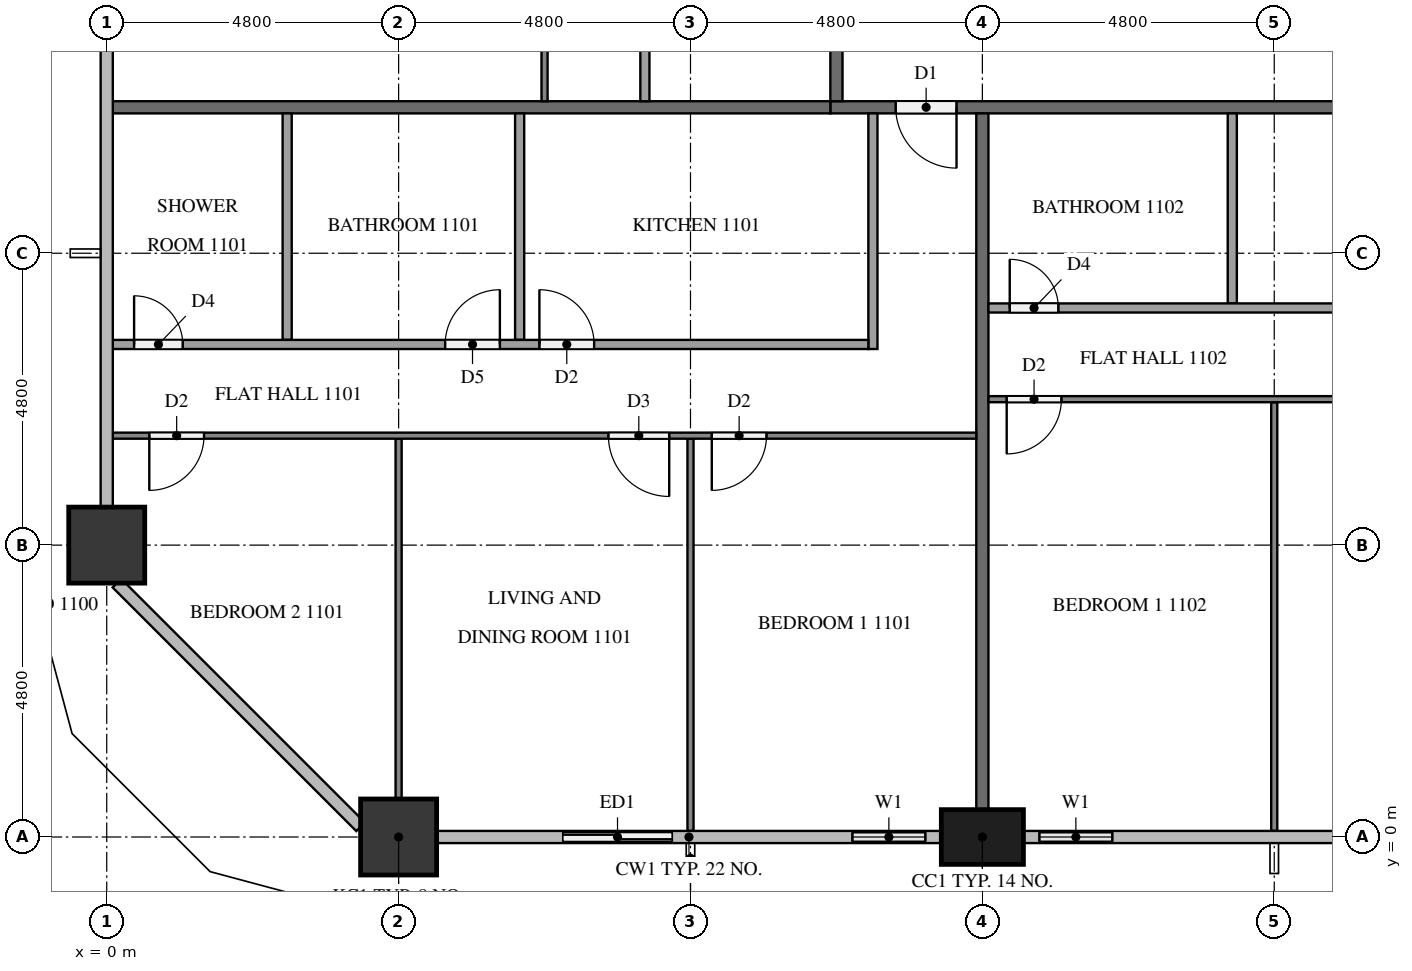
"""IFC4 building model, lengths in metres.
Left out: names, types, materials, properties, quantities, classifications, styles, units other than length and angle.
Written with IfcOpenShell. Run it as: python <this file> out.ifc"""

import sys

from ifc_helpers import new_model, si_unit, direction, frame, frame_2d, origin, origin_2d, place, context, subcontext, project, spatial, rectangle, extrude, element, fill, save


model = new_model("IFC4")
c1 = context("Model", 3, precision=1e-05, world=origin(), true_north=direction((0.0, 1.0)))
c2 = subcontext(c1, "Body", "Model", "MODEL_VIEW")
j1 = project(units=[si_unit("LENGTHUNIT", "METRE"), si_unit("PLANEANGLEUNIT", "RADIAN")], contexts=[c1])
p1 = place(None, origin())
s1 = spatial("IfcSite", under=j1, at=p1, CompositionType="ELEMENT")
p2 = place(p1, origin())
s2 = spatial("IfcBuilding", under=s1, at=p2, CompositionType="ELEMENT")
p3 = place(p2, frame((0.0, 0.0, 46.9)))
s3 = spatial("IfcBuildingStorey", under=s2, at=p3, CompositionType="ELEMENT", Elevation=46.9)
p4 = place(p3, frame((4.8, 0.0, 0.0), z_axis=(0.0, 0.0, 1.0), x_axis=(1.0, 0.0, 0.0)))
e1 = element("IfcColumn", 1, at=p4, inside=s3, PredefinedType="COLUMN", context=c2, shape_type="SweptSolid", body=[
    extrude(rectangle(XDim=1.25, YDim=1.25, at=origin_2d()), origin(), (0.0, 0.0, 1.0), 3.2),
])
p5 = place(p3, frame((14.4, 0.0, 0.0), z_axis=(0.0, 0.0, 1.0), x_axis=(1.0, 0.0, 0.0)))
e2 = element("IfcColumn", 2, at=p5, inside=s3, PredefinedType="COLUMN", context=c2, shape_type="SweptSolid", body=[
    extrude(rectangle(XDim=1.35, YDim=0.9, at=origin_2d()), origin(), (0.0, 0.0, 1.0), 3.2),
])
p6 = place(p3, frame((0.0, 4.8, 0.0), z_axis=(0.0, 0.0, 1.0), x_axis=(1.0, 0.0, 0.0)))
e3 = element("IfcColumn", 3, at=p6, inside=s3, PredefinedType="COLUMN", context=c2, shape_type="SweptSolid", body=[
    extrude(rectangle(XDim=1.25, YDim=1.25, at=origin_2d()), origin(), (0.0, 0.0, 1.0), 3.2),
])
p7 = place(p3, frame((7.2, 0.0, 0.0), z_axis=(0.0, 0.0, 1.0), x_axis=(1.0, 0.0, 0.0)))
e4 = element("IfcWall", 4, at=p7, inside=s3, PredefinedType="SOLIDWALL", context=c2, shape_type="SweptSolid", body=[
    extrude(rectangle(XDim=2.4, YDim=0.15, at=frame_2d((1.2, 0.0))), origin(), (0.0, 0.0, 1.0), 3.2),
])
p8 = place(p7, frame((0.3, 0.0, 0.0)))
e5 = element("IfcOpeningElement", 5, at=p8, cuts=e4, PredefinedType="OPENING", context=c2, shape_type="SweptSolid", body=[
    extrude(rectangle(XDim=1.8, YDim=2.4, at=frame_2d((0.9, 1.2))), frame((0.0, 0.085, 0.0), z_axis=(0.0, -1.0, 0.0), x_axis=(1.0, 0.0, 0.0)), (0.0, 0.0, 1.0), 0.17),
])
p9 = place(p3, frame((12.0, 0.0, 0.0), z_axis=(0.0, 0.0, 1.0), x_axis=(1.0, 0.0, 0.0)))
e6 = element("IfcWall", 6, at=p9, inside=s3, PredefinedType="SOLIDWALL", context=c2, shape_type="SweptSolid", body=[
    extrude(rectangle(XDim=1.725, YDim=0.15, at=frame_2d((0.863, 0.0))), origin(), (0.0, 0.0, 1.0), 3.2),
])
p10 = place(p9, frame((0.262, 0.0, 0.9)))
e7 = element("IfcOpeningElement", 7, at=p10, cuts=e6, PredefinedType="OPENING", context=c2, shape_type="SweptSolid", body=[
    extrude(rectangle(XDim=1.2, YDim=1.4, at=frame_2d((0.6, 0.7))), frame((0.0, 0.085, 0.0), z_axis=(0.0, -1.0, 0.0), x_axis=(1.0, 0.0, 0.0)), (0.0, 0.0, 1.0), 0.17),
])
p11 = place(p3, frame((15.075, 0.0, 0.0), z_axis=(0.0, 0.0, 1.0), x_axis=(1.0, 0.0, 0.0)))
e8 = element("IfcWall", 8, at=p11, inside=s3, PredefinedType="SOLIDWALL", context=c2, shape_type="SweptSolid", body=[
    extrude(rectangle(XDim=1.725, YDim=0.15, at=frame_2d((0.863, 0.0))), origin(), (0.0, 0.0, 1.0), 3.2),
])
p12 = place(p11, frame((0.262, 0.0, 0.9)))
e9 = element("IfcOpeningElement", 9, at=p12, cuts=e8, PredefinedType="OPENING", context=c2, shape_type="SweptSolid", body=[
    extrude(rectangle(XDim=1.2, YDim=1.4, at=frame_2d((0.6, 0.7))), frame((0.0, 0.085, 0.0), z_axis=(0.0, -1.0, 0.0), x_axis=(1.0, 0.0, 0.0)), (0.0, 0.0, 1.0), 0.17),
])
p13 = place(p3, frame((50.5, 12.0, 0.0), z_axis=(0.0, 0.0, 1.0), x_axis=(-1.0, 0.0, 0.0)))
e10 = element("IfcWall", 10, at=p13, inside=s3, PredefinedType="PARTITIONING", context=c2, shape_type="SweptSolid", body=[
    extrude(rectangle(XDim=38.6, YDim=0.2, at=frame_2d((19.3, 0.0))), origin(), (0.0, 0.0, 1.0), 3.2),
])
p14 = place(p13, frame((36.525, 0.0, 0.0)))
e11 = element("IfcOpeningElement", 11, at=p14, cuts=e10, PredefinedType="OPENING", context=c2, shape_type="SweptSolid", body=[
    extrude(rectangle(XDim=1.0, YDim=2.1, at=frame_2d((0.5, 1.05))), frame((0.0, 0.11, 0.0), z_axis=(0.0, -1.0, 0.0), x_axis=(1.0, 0.0, 0.0)), (0.0, 0.0, 1.0), 0.22),
])
p15 = place(p13, frame((24.525, 0.0, 0.0)))
e12 = element("IfcOpeningElement", 12, at=p15, cuts=e10, PredefinedType="OPENING", context=c2, shape_type="SweptSolid", body=[
    extrude(rectangle(XDim=1.0, YDim=2.1, at=frame_2d((0.5, 1.05))), frame((0.0, 0.11, 0.0), z_axis=(0.0, -1.0, 0.0), x_axis=(1.0, 0.0, 0.0)), (0.0, 0.0, 1.0), 0.22),
])
p16 = place(p13, frame((22.675, 0.0, 0.0)))
e13 = element("IfcOpeningElement", 13, at=p16, cuts=e10, PredefinedType="OPENING", context=c2, shape_type="SweptSolid", body=[
    extrude(rectangle(XDim=1.0, YDim=2.1, at=frame_2d((0.5, 1.05))), frame((0.0, 0.11, 0.0), z_axis=(0.0, -1.0, 0.0), x_axis=(1.0, 0.0, 0.0)), (0.0, 0.0, 1.0), 0.22),
])
p17 = place(p13, frame((8.275, 0.0, 0.0)))
e14 = element("IfcOpeningElement", 14, at=p17, cuts=e10, PredefinedType="OPENING", context=c2, shape_type="SweptSolid", body=[
    extrude(rectangle(XDim=1.0, YDim=2.1, at=frame_2d((0.5, 1.05))), frame((0.0, 0.11, 0.0), z_axis=(0.0, -1.0, 0.0), x_axis=(1.0, 0.0, 0.0)), (0.0, 0.0, 1.0), 0.22),
])
p18 = place(p3, frame((12.0, 12.1, 0.0), z_axis=(0.0, 0.0, 1.0), x_axis=(0.0, 1.0, 0.0)))
e15 = element("IfcWall", 15, at=p18, inside=s3, PredefinedType="PARTITIONING", context=c2, shape_type="SweptSolid", body=[
    extrude(rectangle(XDim=28.6, YDim=0.2, at=frame_2d((14.3, 0.0))), origin(), (0.0, 0.0, 1.0), 3.2),
])
p19 = place(p18, frame((26.725, 0.0, 0.0)))
e16 = element("IfcOpeningElement", 16, at=p19, cuts=e15, PredefinedType="OPENING", context=c2, shape_type="SweptSolid", body=[
    extrude(rectangle(XDim=1.0, YDim=2.1, at=frame_2d((0.5, 1.05))), frame((0.0, 0.11, 0.0), z_axis=(0.0, -1.0, 0.0), x_axis=(1.0, 0.0, 0.0)), (0.0, 0.0, 1.0), 0.22),
])
p20 = place(p18, frame((17.125, 0.0, 0.0)))
e17 = element("IfcOpeningElement", 17, at=p20, cuts=e15, PredefinedType="OPENING", context=c2, shape_type="SweptSolid", body=[
    extrude(rectangle(XDim=1.0, YDim=2.1, at=frame_2d((0.5, 1.05))), frame((0.0, 0.11, 0.0), z_axis=(0.0, -1.0, 0.0), x_axis=(1.0, 0.0, 0.0)), (0.0, 0.0, 1.0), 0.22),
])
p21 = place(p18, frame((15.275, 0.0, 0.0)))
e18 = element("IfcOpeningElement", 18, at=p21, cuts=e15, PredefinedType="OPENING", context=c2, shape_type="SweptSolid", body=[
    extrude(rectangle(XDim=1.0, YDim=2.1, at=frame_2d((0.5, 1.05))), frame((0.0, 0.11, 0.0), z_axis=(0.0, -1.0, 0.0), x_axis=(1.0, 0.0, 0.0)), (0.0, 0.0, 1.0), 0.22),
])
p22 = place(p18, frame((5.675, 0.0, 0.0)))
e19 = element("IfcOpeningElement", 19, at=p22, cuts=e15, PredefinedType="OPENING", context=c2, shape_type="SweptSolid", body=[
    extrude(rectangle(XDim=1.0, YDim=2.1, at=frame_2d((0.5, 1.05))), frame((0.0, 0.11, 0.0), z_axis=(0.0, -1.0, 0.0), x_axis=(1.0, 0.0, 0.0)), (0.0, 0.0, 1.0), 0.22),
])
p23 = place(p3, frame((14.4, 11.9, 0.0), z_axis=(0.0, 0.0, 1.0), x_axis=(0.0, -1.0, 0.0)))
e20 = element("IfcWall", 20, at=p23, inside=s3, PredefinedType="PARTITIONING", context=c2, shape_type="SweptSolid", body=[
    extrude(rectangle(XDim=11.45, YDim=0.2, at=frame_2d((5.725, 0.0))), origin(), (0.0, 0.0, 1.0), 3.2),
])
p24 = place(p3, frame((0.1, 12.0, 0.0), z_axis=(0.0, 0.0, 1.0), x_axis=(1.0, 0.0, 0.0)))
e21 = element("IfcWall", 21, at=p24, inside=s3, PredefinedType="PARTITIONING", context=c2, shape_type="SweptSolid", body=[
    extrude(rectangle(XDim=11.8, YDim=0.2, at=frame_2d((5.9, 0.0))), origin(), (0.0, 0.0, 1.0), 3.2),
])
p25 = place(p3, frame((9.6, 6.55, 0.0), z_axis=(0.0, 0.0, 1.0), x_axis=(0.0, -1.0, 0.0)))
e22 = element("IfcWall", 22, at=p25, inside=s3, PredefinedType="PARTITIONING", context=c2, shape_type="SweptSolid", body=[
    extrude(rectangle(XDim=6.45, YDim=0.1, at=frame_2d((3.225, 0.0))), origin(), (0.0, 0.0, 1.0), 3.2),
])
p26 = place(p3, frame((4.8, 6.55, 0.0), z_axis=(0.0, 0.0, 1.0), x_axis=(0.0, -1.0, 0.0)))
e23 = element("IfcWall", 23, at=p26, inside=s3, PredefinedType="PARTITIONING", context=c2, shape_type="SweptSolid", body=[
    extrude(rectangle(XDim=5.925, YDim=0.1, at=frame_2d((2.962, 0.0))), origin(), (0.0, 0.0, 1.0), 3.2),
])
p27 = place(p3, frame((14.3, 6.6, 0.0), z_axis=(0.0, 0.0, 1.0), x_axis=(-1.0, 0.0, 0.0)))
e24 = element("IfcWall", 24, at=p27, inside=s3, PredefinedType="PARTITIONING", context=c2, shape_type="SweptSolid", body=[
    extrude(rectangle(XDim=14.2, YDim=0.1, at=frame_2d((7.1, 0.0))), origin(), (0.0, 0.0, 1.0), 3.2),
])
p28 = place(p27, frame((3.45, 0.0, 0.0)))
e25 = element("IfcOpeningElement", 25, at=p28, cuts=e24, PredefinedType="OPENING", context=c2, shape_type="SweptSolid", body=[
    extrude(rectangle(XDim=0.9, YDim=2.1, at=frame_2d((0.45, 1.05))), frame((0.0, 0.06, 0.0), z_axis=(0.0, -1.0, 0.0), x_axis=(1.0, 0.0, 0.0)), (0.0, 0.0, 1.0), 0.12),
])
p29 = place(p27, frame((5.05, 0.0, 0.0)))
e26 = element("IfcOpeningElement", 26, at=p29, cuts=e24, PredefinedType="OPENING", context=c2, shape_type="SweptSolid", body=[
    extrude(rectangle(XDim=1.0, YDim=2.1, at=frame_2d((0.5, 1.05))), frame((0.0, 0.06, 0.0), z_axis=(0.0, -1.0, 0.0), x_axis=(1.0, 0.0, 0.0)), (0.0, 0.0, 1.0), 0.12),
])
p30 = place(p27, frame((12.7, 0.0, 0.0)))
e27 = element("IfcOpeningElement", 27, at=p30, cuts=e24, PredefinedType="OPENING", context=c2, shape_type="SweptSolid", body=[
    extrude(rectangle(XDim=0.9, YDim=2.1, at=frame_2d((0.45, 1.05))), frame((0.0, 0.06, 0.0), z_axis=(0.0, -1.0, 0.0), x_axis=(1.0, 0.0, 0.0)), (0.0, 0.0, 1.0), 0.12),
])
for number, where, z_axis, x_axis in (
    (28, (6.79, 11.9, 0.0), (0.0, 0.0, 1.0), (0.0, -1.0, 0.0)),
    (29, (2.967, 11.9, 0.0), (0.0, 0.0, 1.0), (0.0, -1.0, 0.0)),
):
    element("IfcWall", number, at=place(p3, frame(where, z_axis=z_axis, x_axis=x_axis)), inside=s3, PredefinedType="PARTITIONING", context=c2, shape_type="SweptSolid", body=[
        extrude(rectangle(XDim=3.725, YDim=0.15, at=frame_2d((1.862, 0.0))), origin(), (0.0, 0.0, 1.0), 3.2),
    ])
p31 = place(p3, frame((12.6, 11.9, 0.0), z_axis=(0.0, 0.0, 1.0), x_axis=(0.0, -1.0, 0.0)))
e30 = element("IfcWall", 30, at=p31, inside=s3, PredefinedType="PARTITIONING", context=c2, shape_type="SweptSolid", body=[
    extrude(rectangle(XDim=3.875, YDim=0.15, at=frame_2d((1.938, 0.0))), origin(), (0.0, 0.0, 1.0), 3.2),
])
p32 = place(p3, frame((0.1, 8.1, 0.0), z_axis=(0.0, 0.0, 1.0), x_axis=(1.0, 0.0, 0.0)))
e31 = element("IfcWall", 31, at=p32, inside=s3, PredefinedType="PARTITIONING", context=c2, shape_type="SweptSolid", body=[
    extrude(rectangle(XDim=12.425, YDim=0.15, at=frame_2d((6.212, 0.0))), origin(), (0.0, 0.0, 1.0), 3.2),
])
p33 = place(p32, frame((7.015, 0.0, 0.0)))
e32 = element("IfcOpeningElement", 32, at=p33, cuts=e31, PredefinedType="OPENING", context=c2, shape_type="SweptSolid", body=[
    extrude(rectangle(XDim=0.9, YDim=2.1, at=frame_2d((0.45, 1.05))), frame((0.0, 0.085, 0.0), z_axis=(0.0, -1.0, 0.0), x_axis=(1.0, 0.0, 0.0)), (0.0, 0.0, 1.0), 0.17),
])
p34 = place(p32, frame((5.465, 0.0, 0.0)))
e33 = element("IfcOpeningElement", 33, at=p34, cuts=e31, PredefinedType="OPENING", context=c2, shape_type="SweptSolid", body=[
    extrude(rectangle(XDim=0.9, YDim=2.1, at=frame_2d((0.45, 1.05))), frame((0.0, 0.085, 0.0), z_axis=(0.0, -1.0, 0.0), x_axis=(1.0, 0.0, 0.0)), (0.0, 0.0, 1.0), 0.17),
])
p35 = place(p32, frame((0.35, 0.0, 0.0)))
e34 = element("IfcOpeningElement", 34, at=p35, cuts=e31, PredefinedType="OPENING", context=c2, shape_type="SweptSolid", body=[
    extrude(rectangle(XDim=0.8, YDim=2.1, at=frame_2d((0.4, 1.05))), frame((0.0, 0.085, 0.0), z_axis=(0.0, -1.0, 0.0), x_axis=(1.0, 0.0, 0.0)), (0.0, 0.0, 1.0), 0.17),
])
p36 = place(p3, frame((19.2, 7.15, 0.0), z_axis=(0.0, 0.0, 1.0), x_axis=(0.0, -1.0, 0.0)))
e35 = element("IfcWall", 35, at=p36, inside=s3, PredefinedType="PARTITIONING", context=c2, shape_type="SweptSolid", body=[
    extrude(rectangle(XDim=7.05, YDim=0.1, at=frame_2d((3.525, 0.0))), origin(), (0.0, 0.0, 1.0), 3.2),
])
p37 = place(p3, frame((26.3, 7.2, 0.0), z_axis=(0.0, 0.0, 1.0), x_axis=(-1.0, 0.0, 0.0)))
e36 = element("IfcWall", 36, at=p37, inside=s3, PredefinedType="PARTITIONING", context=c2, shape_type="SweptSolid", body=[
    extrude(rectangle(XDim=11.8, YDim=0.1, at=frame_2d((5.9, 0.0))), origin(), (0.0, 0.0, 1.0), 3.2),
])
p38 = place(p37, frame((0.3, 0.0, 0.0)))
e37 = element("IfcOpeningElement", 37, at=p38, cuts=e36, PredefinedType="OPENING", context=c2, shape_type="SweptSolid", body=[
    extrude(rectangle(XDim=1.0, YDim=2.1, at=frame_2d((0.5, 1.05))), frame((0.0, 0.06, 0.0), z_axis=(0.0, -1.0, 0.0), x_axis=(1.0, 0.0, 0.0)), (0.0, 0.0, 1.0), 0.12),
])
p39 = place(p37, frame((10.6, 0.0, 0.0)))
e38 = element("IfcOpeningElement", 38, at=p39, cuts=e36, PredefinedType="OPENING", context=c2, shape_type="SweptSolid", body=[
    extrude(rectangle(XDim=0.9, YDim=2.1, at=frame_2d((0.45, 1.05))), frame((0.0, 0.06, 0.0), z_axis=(0.0, -1.0, 0.0), x_axis=(1.0, 0.0, 0.0)), (0.0, 0.0, 1.0), 0.12),
])
p40 = place(p3, frame((18.51, 11.9, 0.0), z_axis=(0.0, 0.0, 1.0), x_axis=(0.0, -1.0, 0.0)))
e39 = element("IfcWall", 39, at=p40, inside=s3, PredefinedType="PARTITIONING", context=c2, shape_type="SweptSolid", body=[
    extrude(rectangle(XDim=3.125, YDim=0.15, at=frame_2d((1.562, 0.0))), origin(), (0.0, 0.0, 1.0), 3.2),
])
p41 = place(p3, frame((14.5, 8.7, 0.0), z_axis=(0.0, 0.0, 1.0), x_axis=(1.0, 0.0, 0.0)))
e40 = element("IfcWall", 40, at=p41, inside=s3, PredefinedType="PARTITIONING", context=c2, shape_type="SweptSolid", body=[
    extrude(rectangle(XDim=10.025, YDim=0.15, at=frame_2d((5.012, 0.0))), origin(), (0.0, 0.0, 1.0), 3.2),
])
p42 = place(p41, frame((8.825, 0.0, 0.0)))
e41 = element("IfcOpeningElement", 41, at=p42, cuts=e40, PredefinedType="OPENING", context=c2, shape_type="SweptSolid", body=[
    extrude(rectangle(XDim=0.9, YDim=2.1, at=frame_2d((0.45, 1.05))), frame((0.0, 0.085, 0.0), z_axis=(0.0, -1.0, 0.0), x_axis=(1.0, 0.0, 0.0)), (0.0, 0.0, 1.0), 0.17),
])
p43 = place(p41, frame((0.35, 0.0, 0.0)))
e42 = element("IfcOpeningElement", 42, at=p43, cuts=e40, PredefinedType="OPENING", context=c2, shape_type="SweptSolid", body=[
    extrude(rectangle(XDim=0.8, YDim=2.1, at=frame_2d((0.4, 1.05))), frame((0.0, 0.085, 0.0), z_axis=(0.0, -1.0, 0.0), x_axis=(1.0, 0.0, 0.0)), (0.0, 0.0, 1.0), 0.17),
])
p44 = place(p3, frame((7.2, 12.1, 0.0), z_axis=(0.0, 0.0, 1.0), x_axis=(0.0, 1.0, 0.0)))
e43 = element("IfcWall", 43, at=p44, inside=s3, PredefinedType="PARTITIONING", context=c2, shape_type="SweptSolid", body=[
    extrude(rectangle(XDim=7.0, YDim=0.1, at=frame_2d((3.5, 0.0))), origin(), (0.0, 0.0, 1.0), 3.2),
])
p45 = place(p44, frame((5.7, 0.0, 0.0)))
e44 = element("IfcOpeningElement", 44, at=p45, cuts=e43, PredefinedType="OPENING", context=c2, shape_type="SweptSolid", body=[
    extrude(rectangle(XDim=1.0, YDim=2.1, at=frame_2d((0.5, 1.05))), frame((0.0, 0.06, 0.0), z_axis=(0.0, -1.0, 0.0), x_axis=(1.0, 0.0, 0.0)), (0.0, 0.0, 1.0), 0.12),
])
p46 = place(p3, frame((8.85, 17.325, 0.0), z_axis=(0.0, 0.0, 1.0), x_axis=(0.0, -1.0, 0.0)))
e45 = element("IfcWall", 45, at=p46, inside=s3, PredefinedType="PARTITIONING", context=c2, shape_type="SweptSolid", body=[
    extrude(rectangle(XDim=5.225, YDim=0.15, at=frame_2d((2.612, 0.0))), origin(), (0.0, 0.0, 1.0), 3.2),
])
p47 = place(p46, frame((0.965, 0.0, 0.0)))
e46 = element("IfcOpeningElement", 46, at=p47, cuts=e45, PredefinedType="OPENING", context=c2, shape_type="SweptSolid", body=[
    extrude(rectangle(XDim=0.8, YDim=2.1, at=frame_2d((0.4, 1.05))), frame((0.0, 0.085, 0.0), z_axis=(0.0, -1.0, 0.0), x_axis=(1.0, 0.0, 0.0)), (0.0, 0.0, 1.0), 0.17),
])
p48 = place(p46, frame((2.415, 0.0, 0.0)))
e47 = element("IfcOpeningElement", 47, at=p48, cuts=e45, PredefinedType="OPENING", context=c2, shape_type="SweptSolid", body=[
    extrude(rectangle(XDim=0.9, YDim=2.1, at=frame_2d((0.45, 1.05))), frame((0.0, 0.085, 0.0), z_axis=(0.0, -1.0, 0.0), x_axis=(1.0, 0.0, 0.0)), (0.0, 0.0, 1.0), 0.17),
])
p49 = place(p8, origin())
e48 = element("IfcDoor", 48, at=p49, inside=s3, OperationType="SLIDING_TO_LEFT", PredefinedType="DOOR", context=c2, shape_type="SweptSolid", body=[
    extrude(rectangle(XDim=1.8, YDim=2.4, at=frame_2d((0.9, 1.2))), frame((0.0, 0.025, 0.0), z_axis=(0.0, -1.0, 0.0), x_axis=(1.0, 0.0, 0.0)), (0.0, 0.0, 1.0), 0.05),
])
fill(e5, e48)
p50 = place(p10, origin())
e49 = element("IfcWindow", 49, at=p50, inside=s3, PartitioningType="SINGLE_PANEL", PredefinedType="WINDOW", context=c2, shape_type="SweptSolid", body=[
    extrude(rectangle(XDim=1.2, YDim=1.4, at=frame_2d((0.6, 0.7))), frame((0.0, 0.03, 0.0), z_axis=(0.0, -1.0, 0.0), x_axis=(1.0, 0.0, 0.0)), (0.0, 0.0, 1.0), 0.06),
])
fill(e7, e49)
p51 = place(p12, origin())
e50 = element("IfcWindow", 50, at=p51, inside=s3, PartitioningType="SINGLE_PANEL", PredefinedType="WINDOW", context=c2, shape_type="SweptSolid", body=[
    extrude(rectangle(XDim=1.2, YDim=1.4, at=frame_2d((0.6, 0.7))), frame((0.0, 0.03, 0.0), z_axis=(0.0, -1.0, 0.0), x_axis=(1.0, 0.0, 0.0)), (0.0, 0.0, 1.0), 0.06),
])
fill(e9, e50)
p52 = place(p14, origin())
e51 = element("IfcDoor", 51, at=p52, inside=s3, OperationType="SINGLE_SWING_LEFT", PredefinedType="DOOR", context=c2, shape_type="SweptSolid", body=[
    extrude(rectangle(XDim=1.0, YDim=2.1, at=frame_2d((0.5, 1.05))), frame((0.0, 0.025, 0.0), z_axis=(0.0, -1.0, 0.0), x_axis=(1.0, 0.0, 0.0)), (0.0, 0.0, 1.0), 0.05),
])
fill(e11, e51)
p53 = place(p28, origin())
e52 = element("IfcDoor", 52, at=p53, inside=s3, OperationType="SINGLE_SWING_RIGHT", PredefinedType="DOOR", context=c2, shape_type="SweptSolid", body=[
    extrude(rectangle(XDim=0.9, YDim=2.1, at=frame_2d((0.45, 1.05))), frame((0.0, 0.025, 0.0), z_axis=(0.0, -1.0, 0.0), x_axis=(1.0, 0.0, 0.0)), (0.0, 0.0, 1.0), 0.05),
])
fill(e25, e52)
p54 = place(p29, origin())
e53 = element("IfcDoor", 53, at=p54, inside=s3, OperationType="SINGLE_SWING_LEFT", PredefinedType="DOOR", context=c2, shape_type="SweptSolid", body=[
    extrude(rectangle(XDim=1.0, YDim=2.1, at=frame_2d((0.5, 1.05))), frame((0.0, 0.025, 0.0), z_axis=(0.0, -1.0, 0.0), x_axis=(1.0, 0.0, 0.0)), (0.0, 0.0, 1.0), 0.05),
])
fill(e26, e53)
p55 = place(p30, origin())
e54 = element("IfcDoor", 54, at=p55, inside=s3, OperationType="SINGLE_SWING_RIGHT", PredefinedType="DOOR", context=c2, shape_type="SweptSolid", body=[
    extrude(rectangle(XDim=0.9, YDim=2.1, at=frame_2d((0.45, 1.05))), frame((0.0, 0.025, 0.0), z_axis=(0.0, -1.0, 0.0), x_axis=(1.0, 0.0, 0.0)), (0.0, 0.0, 1.0), 0.05),
])
fill(e27, e54)
p56 = place(p33, origin())
e55 = element("IfcDoor", 55, at=p56, inside=s3, OperationType="SINGLE_SWING_LEFT", PredefinedType="DOOR", context=c2, shape_type="SweptSolid", body=[
    extrude(rectangle(XDim=0.9, YDim=2.1, at=frame_2d((0.45, 1.05))), frame((0.0, 0.025, 0.0), z_axis=(0.0, -1.0, 0.0), x_axis=(1.0, 0.0, 0.0)), (0.0, 0.0, 1.0), 0.05),
])
fill(e32, e55)
p57 = place(p34, origin())
e56 = element("IfcDoor", 56, at=p57, inside=s3, OperationType="SINGLE_SWING_RIGHT", PredefinedType="DOOR", context=c2, shape_type="SweptSolid", body=[
    extrude(rectangle(XDim=0.9, YDim=2.1, at=frame_2d((0.45, 1.05))), frame((0.0, 0.025, 0.0), z_axis=(0.0, -1.0, 0.0), x_axis=(1.0, 0.0, 0.0)), (0.0, 0.0, 1.0), 0.05),
])
fill(e33, e56)
p58 = place(p35, origin())
e57 = element("IfcDoor", 57, at=p58, inside=s3, OperationType="SINGLE_SWING_LEFT", PredefinedType="DOOR", context=c2, shape_type="SweptSolid", body=[
    extrude(rectangle(XDim=0.8, YDim=2.1, at=frame_2d((0.4, 1.05))), frame((0.0, 0.025, 0.0), z_axis=(0.0, -1.0, 0.0), x_axis=(1.0, 0.0, 0.0)), (0.0, 0.0, 1.0), 0.05),
])
fill(e34, e57)
p59 = place(p39, origin())
e58 = element("IfcDoor", 58, at=p59, inside=s3, OperationType="SINGLE_SWING_RIGHT", PredefinedType="DOOR", context=c2, shape_type="SweptSolid", body=[
    extrude(rectangle(XDim=0.9, YDim=2.1, at=frame_2d((0.45, 1.05))), frame((0.0, 0.025, 0.0), z_axis=(0.0, -1.0, 0.0), x_axis=(1.0, 0.0, 0.0)), (0.0, 0.0, 1.0), 0.05),
])
fill(e38, e58)
p60 = place(p43, origin())
e59 = element("IfcDoor", 59, at=p60, inside=s3, OperationType="SINGLE_SWING_LEFT", PredefinedType="DOOR", context=c2, shape_type="SweptSolid", body=[
    extrude(rectangle(XDim=0.8, YDim=2.1, at=frame_2d((0.4, 1.05))), frame((0.0, 0.025, 0.0), z_axis=(0.0, -1.0, 0.0), x_axis=(1.0, 0.0, 0.0)), (0.0, 0.0, 1.0), 0.05),
])
fill(e42, e59)
save(model, sys.argv[1])
